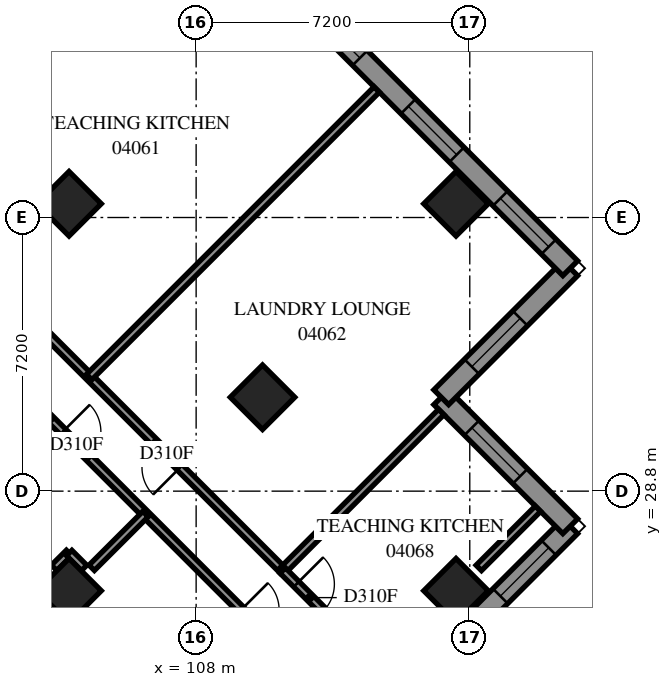
"""IFC4 building model, lengths in metres.
Left out: names, types, materials, properties, quantities, classifications, styles, units other than length and angle.
Written with IfcOpenShell. Run it as: python <this file> out.ifc"""

import sys

from ifc_helpers import new_model, si_unit, direction, frame, frame_2d, origin, origin_2d, place, context, subcontext, project, spatial, polyline, rectangle, outline, extrude, element, fill, save


model = new_model("IFC4")
c1 = context("Model", 3, precision=1e-05, world=origin(), true_north=direction((0.0, 1.0)))
c2 = subcontext(c1, "Body", "Model", "MODEL_VIEW")
j1 = project(units=[si_unit("LENGTHUNIT", "METRE"), si_unit("PLANEANGLEUNIT", "RADIAN")], contexts=[c1])
p1 = place(None, origin())
s1 = spatial("IfcSite", under=j1, at=p1, CompositionType="ELEMENT")
p2 = place(p1, origin())
s2 = spatial("IfcBuilding", under=s1, at=p2, CompositionType="ELEMENT")
p3 = place(p2, frame((0.0, 0.0, 18.6)))
s3 = spatial("IfcBuildingStorey", under=s2, at=p3, CompositionType="ELEMENT", Elevation=18.6)
for number, where, z_axis, x_axis in (
    (1, (104.656, 36.362, 0.0), (0.0, 0.0, 1.0), (0.707, -0.707, 0.0)),
    (2, (114.838, 36.362, 0.0), (0.0, 0.0, 1.0), (0.707, -0.707, 0.0)),
    (3, (109.747, 31.271, 0.0), (0.0, 0.0, 1.0), (0.707, -0.707, 0.0)),
    (4, (104.656, 26.18, 0.0), (0.0, 0.0, 1.0), (0.707, -0.707, 0.0)),
    (5, (114.838, 26.18, 0.0), (0.0, 0.0, 1.0), (0.707, -0.707, 0.0)),
):
    element("IfcColumn", number, at=place(p3, frame(where, z_axis=z_axis, x_axis=x_axis)), inside=s3, PredefinedType="COLUMN", context=c2, shape_type="SweptSolid", body=[
        extrude(rectangle(XDim=1.2, YDim=1.2, at=origin_2d()), origin(), (0.0, 0.0, 1.0), 3.8),
    ])
p4 = place(p3, frame((104.656, 14.689, 0.0), z_axis=(0.0, 0.0, 1.0), x_axis=(0.7071094621, 0.7071041002, 0.0)))
e6 = element("IfcWall", 6, at=p4, inside=s3, PredefinedType="SOLIDWALL", context=c2, shape_type="SweptSolid", body=[
    extrude(outline(polyline([(-0.275, -0.275), (18.925, -0.275), (18.375, 0.275), (0.275, 0.275), (-0.275, -0.275)])), origin(), (0.0, 0.0, 1.0), 3.8),
])
p5 = place(p4, frame((1.825, 0.0, 0.7)))
e7 = element("IfcOpeningElement", 7, at=p5, cuts=e6, PredefinedType="OPENING", context=c2, shape_type="SweptSolid", body=[
    extrude(rectangle(XDim=1.8, YDim=2.4, at=frame_2d((0.9, 1.2))), frame((0.0, 0.285, 0.0), z_axis=(0.0, -1.0, 0.0), x_axis=(1.0, 0.0, 0.0)), (0.0, 0.0, 1.0), 0.57),
])
p6 = place(p4, frame((5.425, 0.0, 0.7)))
e8 = element("IfcOpeningElement", 8, at=p6, cuts=e6, PredefinedType="OPENING", context=c2, shape_type="SweptSolid", body=[
    extrude(rectangle(XDim=1.8, YDim=2.4, at=frame_2d((0.9, 1.2))), frame((0.0, 0.285, 0.0), z_axis=(0.0, -1.0, 0.0), x_axis=(1.0, 0.0, 0.0)), (0.0, 0.0, 1.0), 0.57),
])
p7 = place(p4, frame((9.025, 0.0, 0.7)))
e9 = element("IfcOpeningElement", 9, at=p7, cuts=e6, PredefinedType="OPENING", context=c2, shape_type="SweptSolid", body=[
    extrude(rectangle(XDim=1.8, YDim=2.4, at=frame_2d((0.9, 1.2))), frame((0.0, 0.285, 0.0), z_axis=(0.0, -1.0, 0.0), x_axis=(1.0, 0.0, 0.0)), (0.0, 0.0, 1.0), 0.57),
])
p8 = place(p4, frame((12.625, 0.0, 0.7)))
e10 = element("IfcOpeningElement", 10, at=p8, cuts=e6, PredefinedType="OPENING", context=c2, shape_type="SweptSolid", body=[
    extrude(rectangle(XDim=1.8, YDim=2.4, at=frame_2d((0.9, 1.2))), frame((0.0, 0.285, 0.0), z_axis=(0.0, -1.0, 0.0), x_axis=(1.0, 0.0, 0.0)), (0.0, 0.0, 1.0), 0.57),
])
p9 = place(p4, frame((16.05, 0.0, 0.7)))
e11 = element("IfcOpeningElement", 11, at=p9, cuts=e6, PredefinedType="OPENING", context=c2, shape_type="SweptSolid", body=[
    extrude(rectangle(XDim=1.8, YDim=2.4, at=frame_2d((0.9, 1.2))), frame((0.0, 0.285, 0.0), z_axis=(0.0, -1.0, 0.0), x_axis=(1.0, 0.0, 0.0)), (0.0, 0.0, 1.0), 0.57),
])
p10 = place(p3, frame((117.843, 27.877, 0.0), z_axis=(0.0, 0.0, 1.0), x_axis=(-0.7071067812, 0.7071067812, 0.0)))
e12 = element("IfcWall", 12, at=p10, inside=s3, PredefinedType="SOLIDWALL", context=c2, shape_type="SweptSolid", body=[
    extrude(outline(polyline([(-0.275, -0.275), (4.525, -0.275), (5.075, 0.275), (0.275, 0.275), (-0.275, -0.275)])), origin(), (0.0, 0.0, 1.0), 3.8),
])
p11 = place(p10, frame((1.863, 0.0, 0.7)))
e13 = element("IfcOpeningElement", 13, at=p11, cuts=e12, PredefinedType="OPENING", context=c2, shape_type="SweptSolid", body=[
    extrude(rectangle(XDim=1.8, YDim=2.4, at=frame_2d((0.9, 1.2))), frame((0.0, 0.285, 0.0), z_axis=(0.0, -1.0, 0.0), x_axis=(1.0, 0.0, 0.0)), (0.0, 0.0, 1.0), 0.57),
])
p12 = place(p3, frame((114.449, 31.271, 0.0), z_axis=(0.0, 0.0, 1.0), x_axis=(0.7070963646, 0.7071171977, 0.0)))
e14 = element("IfcWall", 14, at=p12, inside=s3, PredefinedType="SOLIDWALL", context=c2, shape_type="SweptSolid", body=[
    extrude(outline(polyline([(0.275, -0.275), (5.075, -0.275), (4.525, 0.275), (-0.275, 0.275), (0.275, -0.275)])), origin(), (0.0, 0.0, 1.0), 3.8),
])
p13 = place(p12, frame((1.137, 0.0, 0.7)))
e15 = element("IfcOpeningElement", 15, at=p13, cuts=e14, PredefinedType="OPENING", context=c2, shape_type="SweptSolid", body=[
    extrude(rectangle(XDim=1.8, YDim=2.4, at=frame_2d((0.9, 1.2))), frame((0.0, 0.285, 0.0), z_axis=(0.0, -1.0, 0.0), x_axis=(1.0, 0.0, 0.0)), (0.0, 0.0, 1.0), 0.57),
])
p14 = place(p3, frame((117.843, 34.665, 0.0), z_axis=(0.0, 0.0, 1.0), x_axis=(-0.7071067812, 0.7071067812, 0.0)))
e16 = element("IfcWall", 16, at=p14, inside=s3, PredefinedType="SOLIDWALL", context=c2, shape_type="SweptSolid", body=[
    extrude(outline(polyline([(-0.275, -0.275), (54.222, -0.275), (53.994, 0.275), (0.275, 0.275), (-0.275, -0.275)])), origin(), (0.0, 0.0, 1.0), 3.8),
])
p15 = place(p14, frame((0.8, 0.0, 0.7)))
e17 = element("IfcOpeningElement", 17, at=p15, cuts=e16, PredefinedType="OPENING", context=c2, shape_type="SweptSolid", body=[
    extrude(rectangle(XDim=1.8, YDim=2.4, at=frame_2d((0.9, 1.2))), frame((0.0, 0.285, 0.0), z_axis=(0.0, -1.0, 0.0), x_axis=(1.0, 0.0, 0.0)), (0.0, 0.0, 1.0), 0.57),
])
p16 = place(p14, frame((4.225, 0.0, 0.7)))
e18 = element("IfcOpeningElement", 18, at=p16, cuts=e16, PredefinedType="OPENING", context=c2, shape_type="SweptSolid", body=[
    extrude(rectangle(XDim=1.8, YDim=2.4, at=frame_2d((0.9, 1.2))), frame((0.0, 0.285, 0.0), z_axis=(0.0, -1.0, 0.0), x_axis=(1.0, 0.0, 0.0)), (0.0, 0.0, 1.0), 0.57),
])
p17 = place(p14, frame((7.825, 0.0, 0.7)))
e19 = element("IfcOpeningElement", 19, at=p17, cuts=e16, PredefinedType="OPENING", context=c2, shape_type="SweptSolid", body=[
    extrude(rectangle(XDim=1.8, YDim=2.4, at=frame_2d((0.9, 1.2))), frame((0.0, 0.285, 0.0), z_axis=(0.0, -1.0, 0.0), x_axis=(1.0, 0.0, 0.0)), (0.0, 0.0, 1.0), 0.57),
])
p18 = place(p14, frame((11.425, 0.0, 0.7)))
e20 = element("IfcOpeningElement", 20, at=p18, cuts=e16, PredefinedType="OPENING", context=c2, shape_type="SweptSolid", body=[
    extrude(rectangle(XDim=1.8, YDim=2.4, at=frame_2d((0.9, 1.2))), frame((0.0, 0.285, 0.0), z_axis=(0.0, -1.0, 0.0), x_axis=(1.0, 0.0, 0.0)), (0.0, 0.0, 1.0), 0.57),
])
p19 = place(p14, frame((15.025, 0.0, 0.7)))
e21 = element("IfcOpeningElement", 21, at=p19, cuts=e16, PredefinedType="OPENING", context=c2, shape_type="SweptSolid", body=[
    extrude(rectangle(XDim=1.8, YDim=2.4, at=frame_2d((0.9, 1.2))), frame((0.0, 0.285, 0.0), z_axis=(0.0, -1.0, 0.0), x_axis=(1.0, 0.0, 0.0)), (0.0, 0.0, 1.0), 0.57),
])
p20 = place(p14, frame((18.625, 0.0, 0.7)))
e22 = element("IfcOpeningElement", 22, at=p20, cuts=e16, PredefinedType="OPENING", context=c2, shape_type="SweptSolid", body=[
    extrude(rectangle(XDim=1.8, YDim=2.4, at=frame_2d((0.9, 1.2))), frame((0.0, 0.285, 0.0), z_axis=(0.0, -1.0, 0.0), x_axis=(1.0, 0.0, 0.0)), (0.0, 0.0, 1.0), 0.57),
])
p21 = place(p14, frame((22.225, 0.0, 0.7)))
e23 = element("IfcOpeningElement", 23, at=p21, cuts=e16, PredefinedType="OPENING", context=c2, shape_type="SweptSolid", body=[
    extrude(rectangle(XDim=1.8, YDim=2.4, at=frame_2d((0.9, 1.2))), frame((0.0, 0.285, 0.0), z_axis=(0.0, -1.0, 0.0), x_axis=(1.0, 0.0, 0.0)), (0.0, 0.0, 1.0), 0.57),
])
p22 = place(p14, frame((25.825, 0.0, 0.7)))
e24 = element("IfcOpeningElement", 24, at=p22, cuts=e16, PredefinedType="OPENING", context=c2, shape_type="SweptSolid", body=[
    extrude(rectangle(XDim=1.8, YDim=2.4, at=frame_2d((0.9, 1.2))), frame((0.0, 0.285, 0.0), z_axis=(0.0, -1.0, 0.0), x_axis=(1.0, 0.0, 0.0)), (0.0, 0.0, 1.0), 0.57),
])
p23 = place(p14, frame((29.425, 0.0, 0.7)))
e25 = element("IfcOpeningElement", 25, at=p23, cuts=e16, PredefinedType="OPENING", context=c2, shape_type="SweptSolid", body=[
    extrude(rectangle(XDim=1.8, YDim=2.4, at=frame_2d((0.9, 1.2))), frame((0.0, 0.285, 0.0), z_axis=(0.0, -1.0, 0.0), x_axis=(1.0, 0.0, 0.0)), (0.0, 0.0, 1.0), 0.57),
])
p24 = place(p14, frame((33.025, 0.0, 0.7)))
e26 = element("IfcOpeningElement", 26, at=p24, cuts=e16, PredefinedType="OPENING", context=c2, shape_type="SweptSolid", body=[
    extrude(rectangle(XDim=1.8, YDim=2.4, at=frame_2d((0.9, 1.2))), frame((0.0, 0.285, 0.0), z_axis=(0.0, -1.0, 0.0), x_axis=(1.0, 0.0, 0.0)), (0.0, 0.0, 1.0), 0.57),
])
p25 = place(p14, frame((36.625, 0.0, 0.7)))
e27 = element("IfcOpeningElement", 27, at=p25, cuts=e16, PredefinedType="OPENING", context=c2, shape_type="SweptSolid", body=[
    extrude(rectangle(XDim=1.8, YDim=2.4, at=frame_2d((0.9, 1.2))), frame((0.0, 0.285, 0.0), z_axis=(0.0, -1.0, 0.0), x_axis=(1.0, 0.0, 0.0)), (0.0, 0.0, 1.0), 0.57),
])
p26 = place(p14, frame((40.225, 0.0, 0.7)))
e28 = element("IfcOpeningElement", 28, at=p26, cuts=e16, PredefinedType="OPENING", context=c2, shape_type="SweptSolid", body=[
    extrude(rectangle(XDim=1.8, YDim=2.4, at=frame_2d((0.9, 1.2))), frame((0.0, 0.285, 0.0), z_axis=(0.0, -1.0, 0.0), x_axis=(1.0, 0.0, 0.0)), (0.0, 0.0, 1.0), 0.57),
])
p27 = place(p14, frame((43.825, 0.0, 0.7)))
e29 = element("IfcOpeningElement", 29, at=p27, cuts=e16, PredefinedType="OPENING", context=c2, shape_type="SweptSolid", body=[
    extrude(rectangle(XDim=1.8, YDim=2.4, at=frame_2d((0.9, 1.2))), frame((0.0, 0.285, 0.0), z_axis=(0.0, -1.0, 0.0), x_axis=(1.0, 0.0, 0.0)), (0.0, 0.0, 1.0), 0.57),
])
p28 = place(p14, frame((47.425, 0.0, 0.7)))
e30 = element("IfcOpeningElement", 30, at=p28, cuts=e16, PredefinedType="OPENING", context=c2, shape_type="SweptSolid", body=[
    extrude(rectangle(XDim=1.8, YDim=2.4, at=frame_2d((0.9, 1.2))), frame((0.0, 0.285, 0.0), z_axis=(0.0, -1.0, 0.0), x_axis=(1.0, 0.0, 0.0)), (0.0, 0.0, 1.0), 0.57),
])
p29 = place(p14, frame((51.06, 0.0, 0.7)))
e31 = element("IfcOpeningElement", 31, at=p29, cuts=e16, PredefinedType="OPENING", context=c2, shape_type="SweptSolid", body=[
    extrude(rectangle(XDim=1.8, YDim=2.4, at=frame_2d((0.9, 1.2))), frame((0.0, 0.285, 0.0), z_axis=(0.0, -1.0, 0.0), x_axis=(1.0, 0.0, 0.0)), (0.0, 0.0, 1.0), 0.57),
])
p30 = place(p3, frame((77.07, 42.275, 0.0), z_axis=(0.0, 0.0, 1.0), x_axis=(0.7071067812, -0.7071067812, 0.0)))
e32 = element("IfcWall", 32, at=p30, inside=s3, PredefinedType="SOLIDWALL", context=c2, shape_type="SweptSolid", body=[
    extrude(outline(polyline([(0.114, -0.275), (39.288, -0.275), (38.737, 0.275), (-0.114, 0.275), (0.114, -0.275)])), origin(), (0.0, 0.0, 1.0), 3.8),
])
p31 = place(p30, frame((2.837, 0.0, 0.7)))
e33 = element("IfcOpeningElement", 33, at=p31, cuts=e32, PredefinedType="OPENING", context=c2, shape_type="SweptSolid", body=[
    extrude(rectangle(XDim=1.8, YDim=2.4, at=frame_2d((0.9, 1.2))), frame((0.0, 0.285, 0.0), z_axis=(0.0, -1.0, 0.0), x_axis=(1.0, 0.0, 0.0)), (0.0, 0.0, 1.0), 0.57),
])
p32 = place(p30, frame((6.588, 0.0, 0.7)))
e34 = element("IfcOpeningElement", 34, at=p32, cuts=e32, PredefinedType="OPENING", context=c2, shape_type="SweptSolid", body=[
    extrude(rectangle(XDim=1.8, YDim=2.4, at=frame_2d((0.9, 1.2))), frame((0.0, 0.285, 0.0), z_axis=(0.0, -1.0, 0.0), x_axis=(1.0, 0.0, 0.0)), (0.0, 0.0, 1.0), 0.57),
])
p33 = place(p30, frame((10.188, 0.0, 0.7)))
e35 = element("IfcOpeningElement", 35, at=p33, cuts=e32, PredefinedType="OPENING", context=c2, shape_type="SweptSolid", body=[
    extrude(rectangle(XDim=1.8, YDim=2.4, at=frame_2d((0.9, 1.2))), frame((0.0, 0.285, 0.0), z_axis=(0.0, -1.0, 0.0), x_axis=(1.0, 0.0, 0.0)), (0.0, 0.0, 1.0), 0.57),
])
p34 = place(p30, frame((13.787, 0.0, 0.7)))
e36 = element("IfcOpeningElement", 36, at=p34, cuts=e32, PredefinedType="OPENING", context=c2, shape_type="SweptSolid", body=[
    extrude(rectangle(XDim=1.8, YDim=2.4, at=frame_2d((0.9, 1.2))), frame((0.0, 0.285, 0.0), z_axis=(0.0, -1.0, 0.0), x_axis=(1.0, 0.0, 0.0)), (0.0, 0.0, 1.0), 0.57),
])
p35 = place(p30, frame((17.387, 0.0, 0.7)))
e37 = element("IfcOpeningElement", 37, at=p35, cuts=e32, PredefinedType="OPENING", context=c2, shape_type="SweptSolid", body=[
    extrude(rectangle(XDim=1.8, YDim=2.4, at=frame_2d((0.9, 1.2))), frame((0.0, 0.285, 0.0), z_axis=(0.0, -1.0, 0.0), x_axis=(1.0, 0.0, 0.0)), (0.0, 0.0, 1.0), 0.57),
])
p36 = place(p30, frame((20.988, 0.0, 0.7)))
e38 = element("IfcOpeningElement", 38, at=p36, cuts=e32, PredefinedType="OPENING", context=c2, shape_type="SweptSolid", body=[
    extrude(rectangle(XDim=1.8, YDim=2.4, at=frame_2d((0.9, 1.2))), frame((0.0, 0.285, 0.0), z_axis=(0.0, -1.0, 0.0), x_axis=(1.0, 0.0, 0.0)), (0.0, 0.0, 1.0), 0.57),
])
p37 = place(p30, frame((24.587, 0.0, 0.7)))
e39 = element("IfcOpeningElement", 39, at=p37, cuts=e32, PredefinedType="OPENING", context=c2, shape_type="SweptSolid", body=[
    extrude(rectangle(XDim=1.8, YDim=2.4, at=frame_2d((0.9, 1.2))), frame((0.0, 0.285, 0.0), z_axis=(0.0, -1.0, 0.0), x_axis=(1.0, 0.0, 0.0)), (0.0, 0.0, 1.0), 0.57),
])
p38 = place(p30, frame((28.188, 0.0, 0.7)))
e40 = element("IfcOpeningElement", 40, at=p38, cuts=e32, PredefinedType="OPENING", context=c2, shape_type="SweptSolid", body=[
    extrude(rectangle(XDim=1.8, YDim=2.4, at=frame_2d((0.9, 1.2))), frame((0.0, 0.285, 0.0), z_axis=(0.0, -1.0, 0.0), x_axis=(1.0, 0.0, 0.0)), (0.0, 0.0, 1.0), 0.57),
])
p39 = place(p30, frame((31.788, 0.0, 0.7)))
e41 = element("IfcOpeningElement", 41, at=p39, cuts=e32, PredefinedType="OPENING", context=c2, shape_type="SweptSolid", body=[
    extrude(rectangle(XDim=1.8, YDim=2.4, at=frame_2d((0.9, 1.2))), frame((0.0, 0.285, 0.0), z_axis=(0.0, -1.0, 0.0), x_axis=(1.0, 0.0, 0.0)), (0.0, 0.0, 1.0), 0.57),
])
p40 = place(p30, frame((35.388, 0.0, 0.7)))
e42 = element("IfcOpeningElement", 42, at=p40, cuts=e32, PredefinedType="OPENING", context=c2, shape_type="SweptSolid", body=[
    extrude(rectangle(XDim=1.8, YDim=2.4, at=frame_2d((0.9, 1.2))), frame((0.0, 0.285, 0.0), z_axis=(0.0, -1.0, 0.0), x_axis=(1.0, 0.0, 0.0)), (0.0, 0.0, 1.0), 0.57),
])
p41 = place(p3, frame((93.163, 41.697, 0.0), z_axis=(0.0, 0.0, 1.0), x_axis=(0.7071067812, -0.7071067812, 0.0)))
e43 = element("IfcWall", 43, at=p41, inside=s3, PredefinedType="PARTITIONING", context=c2, shape_type="SweptSolid", body=[
    extrude(rectangle(XDim=26.299, YDim=0.2, at=frame_2d((13.149, 0.0))), origin(), (0.0, 0.0, 1.0), 3.8),
])
p42 = place(p41, frame((3.437, 0.0, 0.0)))
e44 = element("IfcOpeningElement", 44, at=p42, cuts=e43, PredefinedType="OPENING", context=c2, shape_type="SweptSolid", body=[
    extrude(rectangle(XDim=1.0, YDim=2.1, at=frame_2d((0.5, 1.05))), frame((0.0, 0.11, 0.0), z_axis=(0.0, -1.0, 0.0), x_axis=(1.0, 0.0, 0.0)), (0.0, 0.0, 1.0), 0.22),
])
p43 = place(p41, frame((10.637, 0.0, 0.0)))
e45 = element("IfcOpeningElement", 45, at=p43, cuts=e43, PredefinedType="OPENING", context=c2, shape_type="SweptSolid", body=[
    extrude(rectangle(XDim=1.0, YDim=2.1, at=frame_2d((0.5, 1.05))), frame((0.0, 0.11, 0.0), z_axis=(0.0, -1.0, 0.0), x_axis=(1.0, 0.0, 0.0)), (0.0, 0.0, 1.0), 0.22),
])
p44 = place(p41, frame((16.024, 0.0, 0.0)))
e46 = element("IfcOpeningElement", 46, at=p44, cuts=e43, PredefinedType="OPENING", context=c2, shape_type="SweptSolid", body=[
    extrude(rectangle(XDim=1.0, YDim=2.1, at=frame_2d((0.5, 1.05))), frame((0.0, 0.11, 0.0), z_axis=(0.0, -1.0, 0.0), x_axis=(1.0, 0.0, 0.0)), (0.0, 0.0, 1.0), 0.22),
])
p45 = place(p41, frame((22.657, 0.0, 0.0)))
e47 = element("IfcOpeningElement", 47, at=p45, cuts=e43, PredefinedType="OPENING", context=c2, shape_type="SweptSolid", body=[
    extrude(rectangle(XDim=1.0, YDim=2.1, at=frame_2d((0.5, 1.05))), frame((0.0, 0.11, 0.0), z_axis=(0.0, -1.0, 0.0), x_axis=(1.0, 0.0, 0.0)), (0.0, 0.0, 1.0), 0.22),
])
p46 = place(p3, frame((110.281, 26.713, 0.0), z_axis=(0.0, 0.0, 1.0), x_axis=(-0.7072363947, 0.7069771439, 0.0)))
e48 = element("IfcWall", 48, at=p46, inside=s3, PredefinedType="PARTITIONING", context=c2, shape_type="SweptSolid", body=[
    extrude(rectangle(XDim=10.8, YDim=0.2, at=frame_2d((5.4, 0.0))), origin(), (0.0, 0.0, 1.0), 3.8),
])
p47 = place(p46, frame((3.827, 0.0, 0.0)))
e49 = element("IfcOpeningElement", 49, at=p47, cuts=e48, PredefinedType="OPENING", context=c2, shape_type="SweptSolid", body=[
    extrude(rectangle(XDim=1.0, YDim=2.1, at=frame_2d((0.5, 1.05))), frame((0.0, 0.11, 0.0), z_axis=(0.0, -1.0, 0.0), x_axis=(1.0, 0.0, 0.0)), (0.0, 0.0, 1.0), 0.22),
])
for number, where, z_axis, x_axis in (
    (50, (100.095, 36.893, 0.0), (0.0, 0.0, 1.0), (0.707, 0.707, 0.0)),
    (51, (105.186, 31.802, 0.0), (0.0, 0.0, 1.0), (0.707, 0.707, 0.0)),
):
    element("IfcWall", number, at=place(p3, frame(where, z_axis=z_axis, x_axis=x_axis)), inside=s3, PredefinedType="PARTITIONING", context=c2, shape_type="SweptSolid", body=[
        extrude(rectangle(XDim=10.699, YDim=0.2, at=frame_2d((5.35, 0.0))), origin(), (0.0, 0.0, 1.0), 3.8),
    ])
p48 = place(p3, frame((110.277, 26.711, 0.0), z_axis=(0.0, 0.0, 1.0), x_axis=(0.7071067812, 0.7071067812, 0.0)))
e52 = element("IfcWall", 52, at=p48, inside=s3, PredefinedType="PARTITIONING", context=c2, shape_type="SweptSolid", body=[
    extrude(rectangle(XDim=5.899, YDim=0.2, at=frame_2d((2.95, 0.0))), origin(), (0.0, 0.0, 1.0), 3.8),
])
p49 = place(p3, frame((110.279, 26.711, 0.0), z_axis=(0.0, 0.0, 1.0), x_axis=(0.7068288851, -0.7073845681, 0.0)))
e53 = element("IfcWall", 53, at=p49, inside=s3, PredefinedType="PARTITIONING", context=c2, shape_type="SweptSolid", body=[
    extrude(rectangle(XDim=3.599, YDim=0.2, at=frame_2d((1.8, 0.0))), origin(), (0.0, 0.0, 1.0), 3.8),
])
p50 = place(p49, frame((0.507, 0.0, 0.0)))
e54 = element("IfcOpeningElement", 54, at=p50, cuts=e53, PredefinedType="OPENING", context=c2, shape_type="SweptSolid", body=[
    extrude(rectangle(XDim=1.0, YDim=2.1, at=frame_2d((0.5, 1.05))), frame((0.0, 0.11, 0.0), z_axis=(0.0, -1.0, 0.0), x_axis=(1.0, 0.0, 0.0)), (0.0, 0.0, 1.0), 0.22),
])
p51 = place(p3, frame((115.438, 26.78, 0.0), z_axis=(0.0, 0.0, 1.0), x_axis=(0.7071067812, 0.7071067812, 0.0)))
e55 = element("IfcWall", 55, at=p51, inside=s3, PredefinedType="PARTITIONING", context=c2, shape_type="SweptSolid", body=[
    extrude(rectangle(XDim=2.201, YDim=0.2, at=frame_2d((1.101, 0.0))), origin(), (0.0, 0.0, 1.0), 3.8),
])
p52 = place(p3, frame((105.252, 26.784, 0.0), z_axis=(0.0, 0.0, 1.0), x_axis=(0.7076063266, 0.7066068826, 0.0)))
e56 = element("IfcWall", 56, at=p52, inside=s3, PredefinedType="PARTITIONING", context=c2, shape_type="SweptSolid", body=[
    extrude(rectangle(XDim=2.001, YDim=0.2, at=frame_2d((1.001, 0.0))), origin(), (0.0, 0.0, 1.0), 3.8),
])
p53 = place(p3, frame((104.263, 26.784, 0.0), z_axis=(0.0, 0.0, 1.0), x_axis=(0.7089037401, 0.705305244, 0.0)))
e57 = element("IfcWall", 57, at=p53, inside=s3, PredefinedType="PARTITIONING", context=c2, shape_type="SweptSolid", body=[
    extrude(rectangle(XDim=0.556, YDim=0.2, at=frame_2d((0.278, 0.0))), origin(), (0.0, 0.0, 1.0), 3.8),
])
p54 = place(p3, frame((104.66, 27.172, 0.0), z_axis=(0.0, 0.0, 1.0), x_axis=(0.7071067812, -0.7071067812, 0.0)))
e58 = element("IfcWall", 58, at=p54, inside=s3, PredefinedType="PARTITIONING", context=c2, shape_type="SweptSolid", body=[
    extrude(rectangle(XDim=0.554, YDim=0.2, at=frame_2d((0.277, 0.0))), origin(), (0.0, 0.0, 1.0), 3.8),
])
p55 = place(p9, origin())
e59 = element("IfcWindow", 59, at=p55, inside=s3, PartitioningType="SINGLE_PANEL", PredefinedType="WINDOW", context=c2, shape_type="SweptSolid", body=[
    extrude(rectangle(XDim=1.8, YDim=2.4, at=frame_2d((0.9, 1.2))), frame((0.0, 0.155, 0.0), z_axis=(0.0, -1.0, 0.0), x_axis=(1.0, 0.0, 0.0)), (0.0, 0.0, 1.0), 0.06),
])
fill(e11, e59)
p56 = place(p11, origin())
e60 = element("IfcWindow", 60, at=p56, inside=s3, PartitioningType="SINGLE_PANEL", PredefinedType="WINDOW", context=c2, shape_type="SweptSolid", body=[
    extrude(rectangle(XDim=1.8, YDim=2.4, at=frame_2d((0.9, 1.2))), frame((0.0, 0.155, 0.0), z_axis=(0.0, -1.0, 0.0), x_axis=(1.0, 0.0, 0.0)), (0.0, 0.0, 1.0), 0.06),
])
fill(e13, e60)
p57 = place(p13, origin())
e61 = element("IfcWindow", 61, at=p57, inside=s3, PartitioningType="SINGLE_PANEL", PredefinedType="WINDOW", context=c2, shape_type="SweptSolid", body=[
    extrude(rectangle(XDim=1.8, YDim=2.4, at=frame_2d((0.9, 1.2))), frame((0.0, 0.155, 0.0), z_axis=(0.0, -1.0, 0.0), x_axis=(1.0, 0.0, 0.0)), (0.0, 0.0, 1.0), 0.06),
])
fill(e15, e61)
p58 = place(p15, origin())
e62 = element("IfcWindow", 62, at=p58, inside=s3, PartitioningType="SINGLE_PANEL", PredefinedType="WINDOW", context=c2, shape_type="SweptSolid", body=[
    extrude(rectangle(XDim=1.8, YDim=2.4, at=frame_2d((0.9, 1.2))), frame((0.0, 0.155, 0.0), z_axis=(0.0, -1.0, 0.0), x_axis=(1.0, 0.0, 0.0)), (0.0, 0.0, 1.0), 0.06),
])
fill(e17, e62)
p59 = place(p16, origin())
e63 = element("IfcWindow", 63, at=p59, inside=s3, PartitioningType="SINGLE_PANEL", PredefinedType="WINDOW", context=c2, shape_type="SweptSolid", body=[
    extrude(rectangle(XDim=1.8, YDim=2.4, at=frame_2d((0.9, 1.2))), frame((0.0, 0.155, 0.0), z_axis=(0.0, -1.0, 0.0), x_axis=(1.0, 0.0, 0.0)), (0.0, 0.0, 1.0), 0.06),
])
fill(e18, e63)
p60 = place(p17, origin())
e64 = element("IfcWindow", 64, at=p60, inside=s3, PartitioningType="SINGLE_PANEL", PredefinedType="WINDOW", context=c2, shape_type="SweptSolid", body=[
    extrude(rectangle(XDim=1.8, YDim=2.4, at=frame_2d((0.9, 1.2))), frame((0.0, 0.155, 0.0), z_axis=(0.0, -1.0, 0.0), x_axis=(1.0, 0.0, 0.0)), (0.0, 0.0, 1.0), 0.06),
])
fill(e19, e64)
p61 = place(p47, origin())
e65 = element("IfcDoor", 65, at=p61, inside=s3, OperationType="SINGLE_SWING_RIGHT", PredefinedType="DOOR", context=c2, shape_type="SweptSolid", body=[
    extrude(rectangle(XDim=1.0, YDim=2.1, at=frame_2d((0.5, 1.05))), frame((0.0, 0.025, 0.0), z_axis=(0.0, -1.0, 0.0), x_axis=(1.0, 0.0, 0.0)), (0.0, 0.0, 1.0), 0.05),
])
fill(e49, e65)
p62 = place(p44, origin())
e66 = element("IfcDoor", 66, at=p62, inside=s3, OperationType="SINGLE_SWING_LEFT", PredefinedType="DOOR", context=c2, shape_type="SweptSolid", body=[
    extrude(rectangle(XDim=1.0, YDim=2.1, at=frame_2d((0.5, 1.05))), frame((0.0, 0.025, 0.0), z_axis=(0.0, -1.0, 0.0), x_axis=(1.0, 0.0, 0.0)), (0.0, 0.0, 1.0), 0.05),
])
fill(e46, e66)
p63 = place(p50, origin())
e67 = element("IfcDoor", 67, at=p63, inside=s3, OperationType="SINGLE_SWING_RIGHT", PredefinedType="DOOR", context=c2, shape_type="SweptSolid", body=[
    extrude(rectangle(XDim=1.0, YDim=2.1, at=frame_2d((0.5, 1.05))), frame((0.0, 0.025, 0.0), z_axis=(0.0, -1.0, 0.0), x_axis=(1.0, 0.0, 0.0)), (0.0, 0.0, 1.0), 0.05),
])
fill(e54, e67)
save(model, sys.argv[1])
